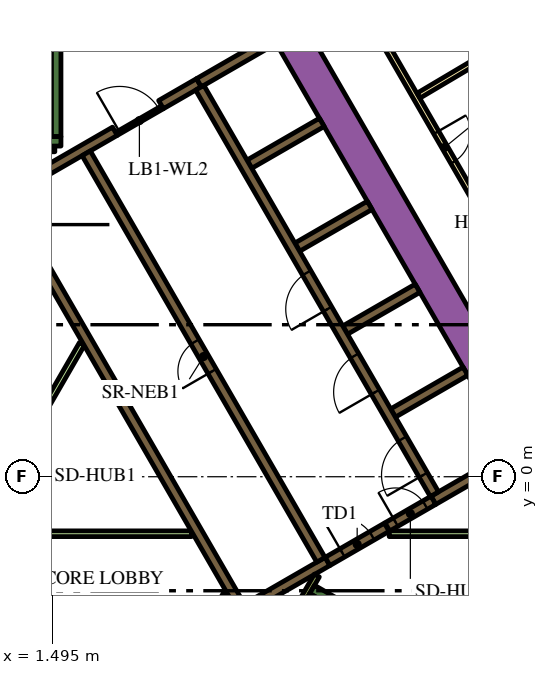
"""IFC4 building model, lengths in metres.
Left out: names, types, materials, properties, quantities, classifications, styles, units other than length and angle.
Written with IfcOpenShell. Run it as: python <this file> out.ifc"""

import sys

from ifc_helpers import new_model, si_unit, direction, frame, frame_2d, origin, place, context, subcontext, project, spatial, polyline, rectangle, outline, extrude, element, fill, save


model = new_model("IFC4")
c1 = context("Model", 3, precision=1e-05, world=origin(), true_north=direction((0.0, 1.0)))
c2 = subcontext(c1, "Body", "Model", "MODEL_VIEW")
j1 = project(units=[si_unit("LENGTHUNIT", "METRE"), si_unit("PLANEANGLEUNIT", "RADIAN")], contexts=[c1])
p1 = place(None, origin())
s1 = spatial("IfcSite", under=j1, at=p1, CompositionType="ELEMENT")
p2 = place(p1, origin())
s2 = spatial("IfcBuilding", under=s1, at=p2, CompositionType="ELEMENT")
p3 = place(p2, frame((0.0, 0.0, 91.5)))
s3 = spatial("IfcBuildingStorey", under=s2, at=p3, CompositionType="ELEMENT", Elevation=91.5)
p4 = place(p3, frame((6.776, 13.364, 0.0), z_axis=(0.0, 0.0, 1.0), x_axis=(0.500004177138, -0.8660229921, 0.0)))
e1 = element("IfcWall", 1, at=p4, inside=s3, PredefinedType="SOLIDWALL", context=c2, shape_type="SweptSolid", body=[
    extrude(rectangle(XDim=20.204, YDim=0.9, at=frame_2d((10.102, 0.0))), origin(), (0.0, 0.0, 1.0), 3.9),
])
p5 = place(p3, frame((8.334, -2.964, 0.0), z_axis=(0.0, 0.0, 1.0), x_axis=(0.866016039709, -0.500016218704, 0.0)))
e2 = element("IfcWall", 2, at=p5, inside=s3, PredefinedType="SOLIDWALL", context=c2, shape_type="SweptSolid", body=[
    extrude(rectangle(XDim=7.05, YDim=0.25, at=frame_2d((3.525, 0.0))), origin(), (0.0, 0.0, 1.0), 3.9),
])
p6 = place(p3, frame((8.168, -3.503, 0.0), z_axis=(0.0, 0.0, 1.0), x_axis=(0.49972245349, 0.866185586049, 0.0)))
e3 = element("IfcWall", 3, at=p6, inside=s3, PredefinedType="SOLIDWALL", context=c2, shape_type="SweptSolid", body=[
    extrude(rectangle(XDim=0.425, YDim=0.25, at=frame_2d((0.212, 0.0))), origin(), (0.0, 0.0, 1.0), 3.9),
])
p7 = place(p3, frame((1.6, 8.95, 0.0), z_axis=(0.0, 0.0, 1.0), x_axis=(0.0, 1.0, 0.0)))
e4 = element("IfcWall", 4, at=p7, inside=s3, PredefinedType="SOLIDWALL", context=c2, shape_type="SweptSolid", body=[
    extrude(rectangle(XDim=6.8, YDim=0.25, at=frame_2d((3.4, 0.0))), origin(), (0.0, 0.0, 1.0), 3.9),
])
p8 = place(p3, frame((1.05, 8.825, 0.0), z_axis=(0.0, 0.0, 1.0), x_axis=(1.0, 0.0, 0.0)))
e5 = element("IfcWall", 5, at=p8, inside=s3, PredefinedType="SOLIDWALL", context=c2, shape_type="SweptSolid", body=[
    extrude(rectangle(XDim=0.675, YDim=0.25, at=frame_2d((0.337, 0.0))), origin(), (0.0, 0.0, 1.0), 3.9),
])
p9 = place(p3, frame((10.464, 1.677, 0.0), z_axis=(0.0, 0.0, 1.0), x_axis=(0.86605622881, 0.499946605688, 0.0)))
e6 = element("IfcWall", 6, at=p9, inside=s3, PredefinedType="SOLIDWALL", context=c2, shape_type="SweptSolid", body=[
    extrude(rectangle(XDim=2.2, YDim=0.25, at=frame_2d((1.1, 0.0))), origin(), (0.0, 0.0, 1.0), 3.9),
])
p10 = place(p3, frame((13.629, 0.594, 0.0), z_axis=(0.0, 0.0, 1.0), x_axis=(-0.866063384774, -0.499934209226, 0.0)))
e7 = element("IfcWall", 7, at=p10, inside=s3, PredefinedType="SOLIDWALL", context=c2, shape_type="SweptSolid", body=[
    extrude(rectangle(XDim=2.428, YDim=0.25, at=frame_2d((1.214, 0.0))), origin(), (0.0, 0.0, 1.0), 3.9),
])
p11 = place(p3, origin())
e8 = element("IfcWall", 8, at=p11, inside=s3, PredefinedType="SOLIDWALL", context=c2, shape_type="SweptSolid", body=[
    extrude(outline(polyline([(0.566, 6.725), (0.566, 6.875), (0.566, 6.875), (0.565, 6.875), (0.361, 6.875), (0.035, 7.439), (0.252, 7.564), (0.377, 7.348), (6.552, -3.348), (6.677, -3.564), (6.46, -3.689), (0.448, 6.725), (0.565, 6.725), (0.566, 6.725), (0.566, 6.725)])), origin(), (0.0, 0.0, 1.0), 3.9),
])
p12 = place(p3, frame((4.358, 9.791, 0.0), z_axis=(0.0, 0.0, 1.0), x_axis=(0.866079547155, 0.499906209203, 0.0)))
e9 = element("IfcWall", 9, at=p12, inside=s3, PredefinedType="SOLIDWALL", context=c2, shape_type="SweptSolid", body=[
    extrude(rectangle(XDim=1.15, YDim=0.25, at=frame_2d((0.575, 0.0))), origin(), (0.0, 0.0, 1.0), 3.9),
])
p13 = place(p3, frame((5.356, 10.367, 0.0), z_axis=(0.0, 0.0, 1.0), x_axis=(0.865978535641, 0.50008116922, 0.0)))
e10 = element("IfcWall", 10, at=p13, inside=s3, PredefinedType="SOLIDWALL", context=c2, shape_type="SweptSolid", body=[
    extrude(rectangle(XDim=2.278, YDim=0.25, at=frame_2d((1.139, 0.0))), origin(), (0.0, 0.0, 1.0), 3.9),
])
p14 = place(p3, frame((0.314, 7.456, 0.0), z_axis=(0.0, 0.0, 1.0), x_axis=(0.866013897511, 0.50001992892, 0.0)))
e11 = element("IfcWall", 11, at=p14, inside=s3, PredefinedType="SOLIDWALL", context=c2, shape_type="SweptSolid", body=[
    extrude(rectangle(XDim=3.268, YDim=0.25, at=frame_2d((1.634, 0.0))), origin(), (0.0, 0.0, 1.0), 3.9),
])
p15 = place(p3, frame((6.614, -3.456, 0.0), z_axis=(0.0, 0.0, 1.0), x_axis=(0.866031582473, 0.499989298045, 0.0)))
e12 = element("IfcWall", 12, at=p15, inside=s3, PredefinedType="SOLIDWALL", context=c2, shape_type="SweptSolid", body=[
    extrude(rectangle(XDim=2.455, YDim=0.25, at=frame_2d((1.228, 0.0))), origin(), (0.0, 0.0, 1.0), 3.9),
])
for number, where, z_axis, x_axis in (
    (13, (6.684, 8.224, 0.0), (0.0, 0.0, 1.0), (0.866, 0.5, 0.0)),
    (14, (7.944, 6.041, 0.0), (0.0, 0.0, 1.0), (0.866, 0.5, 0.0)),
    (15, (9.204, 3.859, 0.0), (0.0, 0.0, 1.0), (0.866, 0.5, 0.0)),
):
    element("IfcWall", number, at=place(p3, frame(where, z_axis=z_axis, x_axis=x_axis)), inside=s3, PredefinedType="SOLIDWALL", context=c2, shape_type="SweptSolid", body=[
        extrude(rectangle(XDim=2.2, YDim=0.25, at=frame_2d((1.1, 0.0))), origin(), (0.0, 0.0, 1.0), 3.9),
    ])
p16 = place(p3, frame((5.705, -3.718, 0.0), z_axis=(0.0, 0.0, 1.0), x_axis=(0.499962090823, 0.866047289552, 0.0)))
e16 = element("IfcWall", 16, at=p16, inside=s3, PredefinedType="PARTITIONING", context=c2, shape_type="SweptSolid", body=[
    extrude(rectangle(XDim=0.735, YDim=0.15, at=frame_2d((0.367, 0.0))), origin(), (0.0, 0.0, 1.0), 2.75),
])
p17 = place(p3, frame((8.459, -2.599, 0.0), z_axis=(0.0, 0.0, 1.0), x_axis=(-0.500041054325, -0.866001699761, 0.0)))
e17 = element("IfcWall", 17, at=p17, inside=s3, PredefinedType="PARTITIONING", context=c2, shape_type="SweptSolid", body=[
    extrude(rectangle(XDim=0.929, YDim=0.15, at=frame_2d((0.464, 0.0))), origin(), (0.0, 0.0, 1.0), 3.9),
])
p18 = place(p3, frame((10.362, -1.5, 0.0), z_axis=(0.0, 0.0, 1.0), x_axis=(1.0, 0.0, 0.0)))
e18 = element("IfcWall", 18, at=p18, inside=s3, PredefinedType="PARTITIONING", context=c2, shape_type="SweptSolid", body=[
    extrude(rectangle(XDim=4.439, YDim=0.15, at=frame_2d((2.22, 0.0))), origin(), (0.0, 0.0, 1.0), 2.75),
])
p19 = place(p3, frame((-4.2, -1.5, 0.0), z_axis=(0.0, 0.0, 1.0), x_axis=(1.0, 0.0, 0.0)))
e19 = element("IfcWall", 19, at=p19, inside=s3, PredefinedType="PARTITIONING", context=c2, shape_type="SweptSolid", body=[
    extrude(rectangle(XDim=9.359, YDim=0.15, at=frame_2d((4.68, 0.0))), origin(), (0.0, 0.0, 1.0), 2.75),
])
p20 = place(p3, frame((1.312, 1.822, 0.0), z_axis=(0.0, 0.0, 1.0), x_axis=(0.500003549559, 0.866023354436, 0.0)))
e20 = element("IfcWall", 20, at=p20, inside=s3, PredefinedType="PARTITIONING", context=c2, shape_type="SweptSolid", body=[
    extrude(rectangle(XDim=1.93, YDim=0.15, at=frame_2d((0.965, 0.0))), origin(), (0.0, 0.0, 1.0), 2.75),
])
p21 = place(p3, frame((1.05, 8.625, 0.0), z_axis=(0.0, 0.0, 1.0), x_axis=(1.0, 0.0, 0.0)))
e21 = element("IfcWall", 21, at=p21, inside=s3, PredefinedType="PARTITIONING", context=c2, shape_type="SweptSolid", body=[
    extrude(rectangle(XDim=0.514, YDim=0.15, at=frame_2d((0.257, 0.0))), origin(), (0.0, 0.0, 1.0), 2.75),
])
p22 = place(p3, frame((11.553, -0.46, 0.0), z_axis=(0.0, 0.0, 1.0), x_axis=(-0.500006514828, 0.866021642414, 0.0)))
e22 = element("IfcWall", 22, at=p22, inside=s3, PredefinedType="SOLIDWALL", context=c2, shape_type="SweptSolid", body=[
    extrude(rectangle(XDim=12.35, YDim=0.25, at=frame_2d((6.175, 0.0))), origin(), (0.0, 0.0, 1.0), 3.9),
])
p23 = place(p22, frame((0.585, 0.0, 0.0)))
e23 = element("IfcOpeningElement", 23, at=p23, cuts=e22, PredefinedType="OPENING", context=c2, shape_type="SweptSolid", body=[
    extrude(rectangle(XDim=1.1, YDim=2.1, at=frame_2d((0.55, 1.05))), frame((0.0, 0.135, 0.0), z_axis=(0.0, -1.0, 0.0), x_axis=(1.0, 0.0, 0.0)), (0.0, 0.0, 1.0), 0.27),
])
p24 = place(p22, frame((3.105, 0.0, 0.0)))
e24 = element("IfcOpeningElement", 24, at=p24, cuts=e22, PredefinedType="OPENING", context=c2, shape_type="SweptSolid", body=[
    extrude(rectangle(XDim=1.1, YDim=2.1, at=frame_2d((0.55, 1.05))), frame((0.0, 0.135, 0.0), z_axis=(0.0, -1.0, 0.0), x_axis=(1.0, 0.0, 0.0)), (0.0, 0.0, 1.0), 0.27),
])
p25 = place(p22, frame((5.625, 0.0, 0.0)))
e25 = element("IfcOpeningElement", 25, at=p25, cuts=e22, PredefinedType="OPENING", context=c2, shape_type="SweptSolid", body=[
    extrude(rectangle(XDim=1.1, YDim=2.1, at=frame_2d((0.55, 1.05))), frame((0.0, 0.135, 0.0), z_axis=(0.0, -1.0, 0.0), x_axis=(1.0, 0.0, 0.0)), (0.0, 0.0, 1.0), 0.27),
])
p26 = place(p3, frame((8.565, -2.185, 0.0), z_axis=(0.0, 0.0, 1.0), x_axis=(-0.499997954832, 0.866026584559, 0.0)))
e26 = element("IfcWall", 26, at=p26, inside=s3, PredefinedType="SOLIDWALL", context=c2, shape_type="SweptSolid", body=[
    extrude(rectangle(XDim=12.35, YDim=0.25, at=frame_2d((6.175, 0.0))), origin(), (0.0, 0.0, 1.0), 3.9),
])
p27 = place(p26, frame((5.725, 0.0, 0.0)))
e27 = element("IfcOpeningElement", 27, at=p27, cuts=e26, PredefinedType="OPENING", context=c2, shape_type="SweptSolid", body=[
    extrude(rectangle(XDim=0.9, YDim=2.1, at=frame_2d((0.45, 1.05))), frame((0.0, 0.135, 0.0), z_axis=(0.0, -1.0, 0.0), x_axis=(1.0, 0.0, 0.0)), (0.0, 0.0, 1.0), 0.27),
])
p28 = place(p3, frame((8.74, -2.229, 0.0), z_axis=(0.0, 0.0, 1.0), x_axis=(0.865989075817, 0.500062916607, 0.0)))
e28 = element("IfcWall", 28, at=p28, inside=s3, PredefinedType="SOLIDWALL", context=c2, shape_type="SweptSolid", body=[
    extrude(rectangle(XDim=1.8, YDim=0.25, at=frame_2d((0.9, 0.0))), origin(), (0.0, 0.0, 1.0), 3.9),
])
p29 = place(p28, frame((0.45, 0.0, 0.0)))
e29 = element("IfcOpeningElement", 29, at=p29, cuts=e28, PredefinedType="OPENING", context=c2, shape_type="SweptSolid", body=[
    extrude(rectangle(XDim=0.9, YDim=2.1, at=frame_2d((0.45, 1.05))), frame((0.0, 0.135, 0.0), z_axis=(0.0, -1.0, 0.0), x_axis=(1.0, 0.0, 0.0)), (0.0, 0.0, 1.0), 0.27),
])
p30 = place(p3, frame((3.183, 9.02, 0.0), z_axis=(0.0, 0.0, 1.0), x_axis=(0.866034573852, 0.49998411664, 0.0)))
e30 = element("IfcWall", 30, at=p30, inside=s3, PredefinedType="PARTITIONING", context=c2, shape_type="SweptSolid", body=[
    extrude(rectangle(XDim=1.4, YDim=0.09, at=frame_2d((0.7, 0.0))), origin(), (0.0, 0.0, 1.0), 2.75),
])
p31 = place(p30, frame((0.1, 0.0, 0.0)))
e31 = element("IfcOpeningElement", 31, at=p31, cuts=e30, PredefinedType="OPENING", context=c2, shape_type="SweptSolid", body=[
    extrude(rectangle(XDim=1.2, YDim=2.1, at=frame_2d((0.6, 1.05))), frame((0.0, 0.055, 0.0), z_axis=(0.0, -1.0, 0.0), x_axis=(1.0, 0.0, 0.0)), (0.0, 0.0, 1.0), 0.11),
])
p32 = place(p3, frame((10.313, -1.32, 0.0), z_axis=(0.0, 0.0, 1.0), x_axis=(0.866034573852, 0.49998411664, 0.0)))
e32 = element("IfcWall", 32, at=p32, inside=s3, PredefinedType="SOLIDWALL", context=c2, shape_type="SweptSolid", body=[
    extrude(rectangle(XDim=1.4, YDim=0.25, at=frame_2d((0.7, 0.0))), origin(), (0.0, 0.0, 1.0), 3.9),
])
p33 = place(p32, frame((0.25, 0.0, 0.0)))
e33 = element("IfcOpeningElement", 33, at=p33, cuts=e32, PredefinedType="OPENING", context=c2, shape_type="SweptSolid", body=[
    extrude(rectangle(XDim=0.9, YDim=2.1, at=frame_2d((0.45, 1.05))), frame((0.0, 0.135, 0.0), z_axis=(0.0, -1.0, 0.0), x_axis=(1.0, 0.0, 0.0)), (0.0, 0.0, 1.0), 0.27),
])
p34 = place(p3, frame((6.163, 18.475, 0.0), z_axis=(0.0, 0.0, 1.0), x_axis=(0.500001317485, -0.866024643133, 0.0)))
e34 = element("IfcWall", 34, at=p34, inside=s3, PredefinedType="PARTITIONING", context=c2, shape_type="SweptSolid", body=[
    extrude(rectangle(XDim=25.767, YDim=0.15, at=frame_2d((12.883, 0.0))), origin(), (0.0, 0.0, 1.0), 2.75),
])
p35 = place(p34, frame((24.241, 0.0, 0.0)))
e35 = element("IfcOpeningElement", 35, at=p35, cuts=e34, PredefinedType="OPENING", context=c2, shape_type="SweptSolid", body=[
    extrude(rectangle(XDim=1.0, YDim=2.1, at=frame_2d((0.5, 1.05))), frame((0.0, 0.085, 0.0), z_axis=(0.0, -1.0, 0.0), x_axis=(1.0, 0.0, 0.0)), (0.0, 0.0, 1.0), 0.17),
])
p36 = place(p34, frame((13.144, 0.0, 0.0)))
e36 = element("IfcOpeningElement", 36, at=p36, cuts=e34, PredefinedType="OPENING", context=c2, shape_type="SweptSolid", body=[
    extrude(rectangle(XDim=1.0, YDim=2.1, at=frame_2d((0.5, 1.05))), frame((0.0, 0.085, 0.0), z_axis=(0.0, -1.0, 0.0), x_axis=(1.0, 0.0, 0.0)), (0.0, 0.0, 1.0), 0.17),
])
p37 = place(p34, frame((10.874, 0.0, 0.0)))
e37 = element("IfcOpeningElement", 37, at=p37, cuts=e34, PredefinedType="OPENING", context=c2, shape_type="SweptSolid", body=[
    extrude(rectangle(XDim=0.9, YDim=2.1, at=frame_2d((0.45, 1.05))), frame((0.0, 0.085, 0.0), z_axis=(0.0, -1.0, 0.0), x_axis=(1.0, 0.0, 0.0)), (0.0, 0.0, 1.0), 0.17),
])
p38 = place(p34, frame((3.718, 0.0, 0.0)))
e38 = element("IfcOpeningElement", 38, at=p38, cuts=e34, PredefinedType="OPENING", context=c2, shape_type="SweptSolid", body=[
    extrude(rectangle(XDim=1.1, YDim=2.1, at=frame_2d((0.55, 1.05))), frame((0.0, 0.085, 0.0), z_axis=(0.0, -1.0, 0.0), x_axis=(1.0, 0.0, 0.0)), (0.0, 0.0, 1.0), 0.17),
])
p39 = place(p34, frame((2.411, 0.0, 0.0)))
e39 = element("IfcOpeningElement", 39, at=p39, cuts=e34, PredefinedType="OPENING", context=c2, shape_type="SweptSolid", body=[
    extrude(rectangle(XDim=1.0, YDim=2.1, at=frame_2d((0.5, 1.05))), frame((0.0, 0.085, 0.0), z_axis=(0.0, -1.0, 0.0), x_axis=(1.0, 0.0, 0.0)), (0.0, 0.0, 1.0), 0.17),
])
p40 = place(p3, frame((17.379, 13.731, 0.0), z_axis=(0.0, 0.0, 1.0), x_axis=(-0.860132461691, -0.510070728768, 0.0)))
e40 = element("IfcWall", 40, at=p40, inside=s3, PredefinedType="PARTITIONING", context=c2, shape_type="SweptSolid", body=[
    extrude(rectangle(XDim=7.257, YDim=0.15, at=frame_2d((3.628, 0.0))), origin(), (0.0, 0.0, 1.0), 2.75),
])
p41 = place(p23, origin())
e41 = element("IfcDoor", 41, at=p41, inside=s3, OperationType="DOUBLE_DOOR_SLIDING", PredefinedType="DOOR", context=c2, shape_type="SweptSolid", body=[
    extrude(rectangle(XDim=1.1, YDim=2.1, at=frame_2d((0.55, 1.05))), frame((0.0, 0.025, 0.0), z_axis=(0.0, -1.0, 0.0), x_axis=(1.0, 0.0, 0.0)), (0.0, 0.0, 1.0), 0.05),
])
fill(e23, e41)
p42 = place(p24, origin())
e42 = element("IfcDoor", 42, at=p42, inside=s3, OperationType="DOUBLE_DOOR_SLIDING", PredefinedType="DOOR", context=c2, shape_type="SweptSolid", body=[
    extrude(rectangle(XDim=1.1, YDim=2.1, at=frame_2d((0.55, 1.05))), frame((0.0, 0.025, 0.0), z_axis=(0.0, -1.0, 0.0), x_axis=(1.0, 0.0, 0.0)), (0.0, 0.0, 1.0), 0.05),
])
fill(e24, e42)
p43 = place(p25, origin())
e43 = element("IfcDoor", 43, at=p43, inside=s3, OperationType="DOUBLE_DOOR_SLIDING", PredefinedType="DOOR", context=c2, shape_type="SweptSolid", body=[
    extrude(rectangle(XDim=1.1, YDim=2.1, at=frame_2d((0.55, 1.05))), frame((0.0, 0.025, 0.0), z_axis=(0.0, -1.0, 0.0), x_axis=(1.0, 0.0, 0.0)), (0.0, 0.0, 1.0), 0.05),
])
fill(e25, e43)
p44 = place(p27, origin())
e44 = element("IfcDoor", 44, at=p44, inside=s3, OperationType="SINGLE_SWING_LEFT", PredefinedType="DOOR", context=c2, shape_type="SweptSolid", body=[
    extrude(rectangle(XDim=0.9, YDim=2.1, at=frame_2d((0.45, 1.05))), frame((0.0, 0.025, 0.0), z_axis=(0.0, -1.0, 0.0), x_axis=(1.0, 0.0, 0.0)), (0.0, 0.0, 1.0), 0.05),
])
fill(e27, e44)
p45 = place(p29, origin())
e45 = element("IfcDoor", 45, at=p45, inside=s3, OperationType="SINGLE_SWING_LEFT", PredefinedType="DOOR", context=c2, shape_type="SweptSolid", body=[
    extrude(rectangle(XDim=0.9, YDim=2.1, at=frame_2d((0.45, 1.05))), frame((0.0, 0.025, 0.0), z_axis=(0.0, -1.0, 0.0), x_axis=(1.0, 0.0, 0.0)), (0.0, 0.0, 1.0), 0.05),
])
fill(e29, e45)
p46 = place(p31, origin())
e46 = element("IfcDoor", 46, at=p46, inside=s3, OperationType="SINGLE_SWING_LEFT", PredefinedType="DOOR", context=c2, shape_type="SweptSolid", body=[
    extrude(rectangle(XDim=1.2, YDim=2.1, at=frame_2d((0.6, 1.05))), frame((0.0, 0.025, 0.0), z_axis=(0.0, -1.0, 0.0), x_axis=(1.0, 0.0, 0.0)), (0.0, 0.0, 1.0), 0.05),
])
fill(e31, e46)
p47 = place(p33, origin())
e47 = element("IfcDoor", 47, at=p47, inside=s3, OperationType="SINGLE_SWING_LEFT", PredefinedType="DOOR", context=c2, shape_type="SweptSolid", body=[
    extrude(rectangle(XDim=0.9, YDim=2.1, at=frame_2d((0.45, 1.05))), frame((0.0, 0.025, 0.0), z_axis=(0.0, -1.0, 0.0), x_axis=(1.0, 0.0, 0.0)), (0.0, 0.0, 1.0), 0.05),
])
fill(e33, e47)
p48 = place(p37, origin())
e48 = element("IfcDoor", 48, at=p48, inside=s3, OperationType="SINGLE_SWING_RIGHT", PredefinedType="DOOR", context=c2, shape_type="SweptSolid", body=[
    extrude(rectangle(XDim=0.9, YDim=2.1, at=frame_2d((0.45, 1.05))), frame((0.0, 0.025, 0.0), z_axis=(0.0, -1.0, 0.0), x_axis=(1.0, 0.0, 0.0)), (0.0, 0.0, 1.0), 0.05),
])
fill(e37, e48)
save(model, sys.argv[1])
